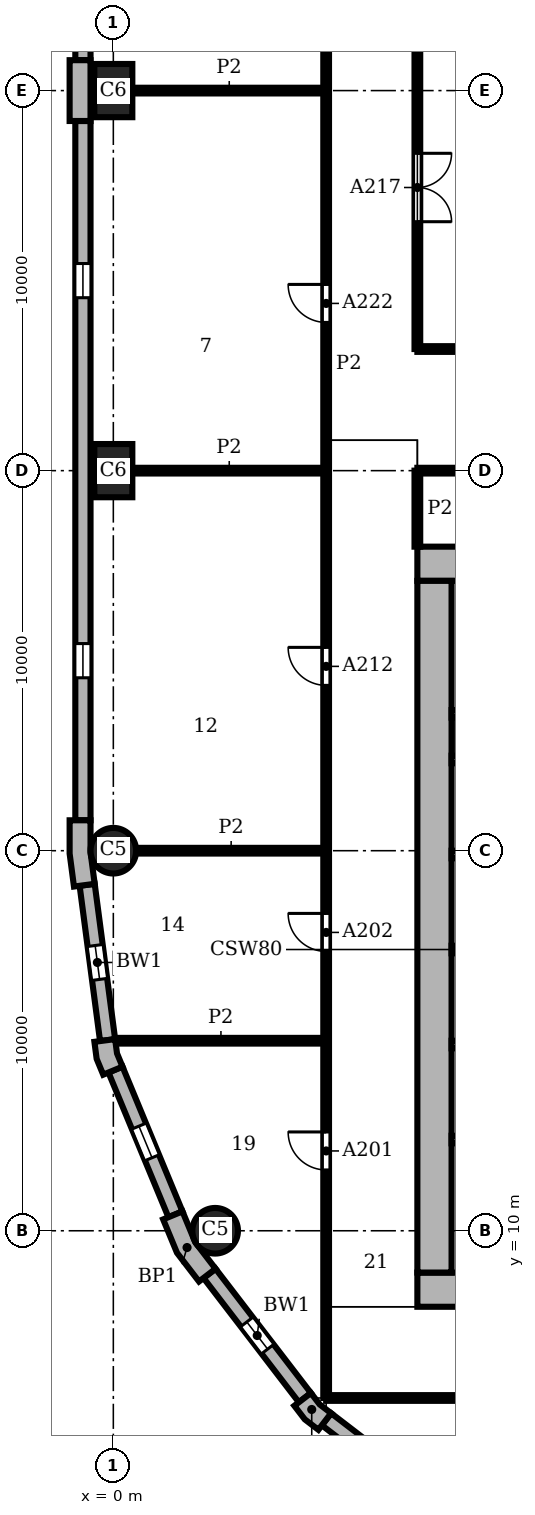
"""IFC4 building model, lengths in metres.
Left out: names, types, materials, properties, quantities, classifications, styles, units other than length and angle.
Written with IfcOpenShell. Run it as: python <this file> out.ifc"""

import sys

from ifc_helpers import new_model, si_unit, direction, frame, frame_2d, origin, origin_2d, place, context, subcontext, project, spatial, polyline, rectangle, circle, outline, extrude, element, fill, save


model = new_model("IFC4")
c1 = context("Model", 3, precision=1e-05, world=origin(), true_north=direction((0.0, 1.0)))
c2 = subcontext(c1, "Body", "Model", "MODEL_VIEW")
j1 = project(units=[si_unit("LENGTHUNIT", "METRE"), si_unit("PLANEANGLEUNIT", "RADIAN")], contexts=[c1])
p1 = place(None, origin())
s1 = spatial("IfcSite", under=j1, at=p1, CompositionType="ELEMENT")
p2 = place(p1, origin())
s2 = spatial("IfcBuilding", under=s1, at=p2, CompositionType="ELEMENT")
p3 = place(p2, frame((0.0, 0.0, 23.7)))
s3 = spatial("IfcBuildingStorey", under=s2, at=p3, CompositionType="ELEMENT", Elevation=23.7)
for number, where, z_axis, x_axis in (
    (1, (0.0, 40.0, 0.0), (0.0, 0.0, 1.0), (0.0, 1.0, 0.0)),
    (2, (0.0, 30.0, 0.0), (0.0, 0.0, 1.0), (0.0, 1.0, 0.0)),
):
    element("IfcColumn", number, at=place(p3, frame(where, z_axis=z_axis, x_axis=x_axis)), inside=s3, PredefinedType="COLUMN", context=c2, shape_type="SweptSolid", body=[
        extrude(rectangle(XDim=1.4, YDim=1.0, at=origin_2d()), origin(), (0.0, 0.0, 1.0), 3.9),
    ])
for number, where, z_axis, x_axis in (
    (3, (0.0, 20.0, 0.0), (0.0, 0.0, 1.0), (1.0, 0.0, 0.0)),
    (4, (2.679, 10.0, 0.0), (0.0, 0.0, 1.0), (1.0, 0.0, 0.0)),
):
    element("IfcColumn", number, at=place(p3, frame(where, z_axis=z_axis, x_axis=x_axis)), inside=s3, PredefinedType="COLUMN", context=c2, shape_type="SweptSolid", body=[
        extrude(circle(Radius=0.6, at=origin_2d()), origin(), (0.0, 0.0, 1.0), 3.9),
    ])
for number, where, z_axis, x_axis in (
    (5, (8.0, 8.45, 0.0), (0.0, 0.0, 1.0), (1.0, 0.0, 0.0)),
    (6, (28.0, 27.55, 0.0), (0.0, 0.0, 1.0), (-1.0, 0.0, 0.0)),
):
    element("IfcWall", number, at=place(p3, frame(where, z_axis=z_axis, x_axis=x_axis)), inside=s3, PredefinedType="SHEAR", context=c2, shape_type="SweptSolid", body=[
        extrude(rectangle(XDim=20.0, YDim=0.9, at=frame_2d((10.0, 0.0))), origin(), (0.0, 0.0, 1.0), 3.9),
    ])
p4 = place(p3, frame((8.45, 27.1, 0.0), z_axis=(0.0, 0.0, 1.0), x_axis=(0.0, -1.0, 0.0)))
e7 = element("IfcWall", 7, at=p4, inside=s3, PredefinedType="SHEAR", context=c2, shape_type="SweptSolid", body=[
    extrude(rectangle(XDim=18.2, YDim=0.9, at=frame_2d((9.1, 0.0))), origin(), (0.0, 0.0, 1.0), 3.9),
])
p5 = place(p3, origin())
e8 = element("IfcWall", 8, at=p5, inside=s3, PredefinedType="SOLIDWALL", context=c2, shape_type="SweptSolid", body=[
    extrude(outline(polyline([(-1.0, 40.8), (-1.15, 40.8), (-1.15, 40.0), (-1.15, 39.2), (-1.0, 39.2), (-0.6, 39.2), (-0.6, 40.0), (-0.6, 40.8), (-1.0, 40.8)])), origin(), (0.0, 0.0, 1.0), 3.9),
])
e9 = element("IfcWall", 9, at=p5, inside=s3, PredefinedType="SOLIDWALL", context=c2, shape_type="SweptSolid", body=[
    extrude(outline(polyline([(-1.0, 20.8), (-1.15, 20.8), (-1.15, 19.925), (-1.036, 19.057), (-0.887, 19.076), (-0.49, 19.128), (-0.6, 19.961), (-0.6, 20.8), (-1.0, 20.8)])), origin(), (0.0, 0.0, 1.0), 3.9),
])
e10 = element("IfcWall", 10, at=p5, inside=s3, PredefinedType="SOLIDWALL", context=c2, shape_type="SweptSolid", body=[
    extrude(outline(polyline([(-0.349, 14.99), (-0.498, 14.971), (-0.439, 14.523), (-0.266, 14.106), (-0.128, 14.164), (0.242, 14.317), (0.097, 14.667), (0.047, 15.043), (-0.349, 14.99)])), origin(), (0.0, 0.0, 1.0), 3.9),
])
e11 = element("IfcWall", 11, at=p5, inside=s3, PredefinedType="SOLIDWALL", context=c2, shape_type="SweptSolid", body=[
    extrude(outline(polyline([(1.449, 10.356), (1.311, 10.299), (1.675, 9.42), (2.254, 8.665), (2.373, 8.757), (2.69, 9.0), (2.155, 9.698), (1.819, 10.51), (1.449, 10.356)])), origin(), (0.0, 0.0, 1.0), 3.9),
])
e12 = element("IfcWall", 12, at=p5, inside=s3, PredefinedType="SOLIDWALL", context=c2, shape_type="SweptSolid", body=[
    extrude(outline(polyline([(4.882, 5.487), (4.763, 5.396), (5.038, 5.038), (5.396, 4.763), (5.487, 4.882), (5.731, 5.199), (5.43, 5.43), (5.199, 5.731), (4.882, 5.487)])), origin(), (0.0, 0.0, 1.0), 3.9),
])
p6 = place(p3, frame((-0.8, 59.2, 0.0), z_axis=(0.0, 0.0, 1.0), x_axis=(0.0, -1.0, 0.0)))
e13 = element("IfcWall", 13, at=p6, inside=s3, PredefinedType="SOLIDWALL", context=c2, shape_type="SweptSolid", body=[
    extrude(rectangle(XDim=18.4, YDim=0.4, at=frame_2d((9.2, 0.0))), origin(), (0.0, 0.0, 1.0), 3.9),
])
p7 = place(p6, frame((3.75, 0.0, 0.9)))
e14 = element("IfcOpeningElement", 14, at=p7, cuts=e13, PredefinedType="OPENING", context=c2, shape_type="SweptSolid", body=[
    extrude(rectangle(XDim=0.9, YDim=2.35, at=frame_2d((0.45, 1.175))), frame((0.0, 0.21, 0.0), z_axis=(0.0, -1.0, 0.0), x_axis=(1.0, 0.0, 0.0)), (0.0, 0.0, 1.0), 0.42),
])
p8 = place(p6, frame((13.75, 0.0, 0.9)))
e15 = element("IfcOpeningElement", 15, at=p8, cuts=e13, PredefinedType="OPENING", context=c2, shape_type="SweptSolid", body=[
    extrude(rectangle(XDim=0.9, YDim=2.35, at=frame_2d((0.45, 1.175))), frame((0.0, 0.21, 0.0), z_axis=(0.0, -1.0, 0.0), x_axis=(1.0, 0.0, 0.0)), (0.0, 0.0, 1.0), 0.42),
])
p9 = place(p3, frame((-0.8, 39.2, 0.0), z_axis=(0.0, 0.0, 1.0), x_axis=(0.0, -1.0, 0.0)))
e16 = element("IfcWall", 16, at=p9, inside=s3, PredefinedType="SOLIDWALL", context=c2, shape_type="SweptSolid", body=[
    extrude(rectangle(XDim=18.4, YDim=0.4, at=frame_2d((9.2, 0.0))), origin(), (0.0, 0.0, 1.0), 3.9),
])
p10 = place(p9, frame((3.75, 0.0, 0.9)))
e17 = element("IfcOpeningElement", 17, at=p10, cuts=e16, PredefinedType="OPENING", context=c2, shape_type="SweptSolid", body=[
    extrude(rectangle(XDim=0.9, YDim=2.35, at=frame_2d((0.45, 1.175))), frame((0.0, 0.21, 0.0), z_axis=(0.0, -1.0, 0.0), x_axis=(1.0, 0.0, 0.0)), (0.0, 0.0, 1.0), 0.42),
])
p11 = place(p9, frame((13.75, 0.0, 0.9)))
e18 = element("IfcOpeningElement", 18, at=p11, cuts=e16, PredefinedType="OPENING", context=c2, shape_type="SweptSolid", body=[
    extrude(rectangle(XDim=0.9, YDim=2.35, at=frame_2d((0.45, 1.175))), frame((0.0, 0.21, 0.0), z_axis=(0.0, -1.0, 0.0), x_axis=(1.0, 0.0, 0.0)), (0.0, 0.0, 1.0), 0.42),
])
p12 = place(p3, frame((-0.689, 19.102, 0.0), z_axis=(0.0, 0.0, 1.0), x_axis=(0.130514280502, -0.991446429508, 0.0)))
e19 = element("IfcWall", 19, at=p12, inside=s3, PredefinedType="SOLIDWALL", context=c2, shape_type="SweptSolid", body=[
    extrude(rectangle(XDim=4.121, YDim=0.4, at=frame_2d((2.061, 0.0))), origin(), (0.0, 0.0, 1.0), 3.9),
])
p13 = place(p12, frame((1.611, 0.0, 0.9)))
e20 = element("IfcOpeningElement", 20, at=p13, cuts=e19, PredefinedType="OPENING", context=c2, shape_type="SweptSolid", body=[
    extrude(rectangle(XDim=0.9, YDim=2.35, at=frame_2d((0.45, 1.175))), frame((0.0, 0.21, 0.0), z_axis=(0.0, -1.0, 0.0), x_axis=(1.0, 0.0, 0.0)), (0.0, 0.0, 1.0), 0.42),
])
p14 = place(p3, frame((0.057, 14.24, 0.0), z_axis=(0.0, 0.0, 1.0), x_axis=(0.382721546029, -0.923863744394, 0.0)))
e21 = element("IfcWall", 21, at=p14, inside=s3, PredefinedType="SOLIDWALL", context=c2, shape_type="SweptSolid", body=[
    extrude(rectangle(XDim=4.121, YDim=0.4, at=frame_2d((2.061, 0.0))), origin(), (0.0, 0.0, 1.0), 3.9),
])
p15 = place(p14, frame((1.611, 0.0, 0.9)))
e22 = element("IfcOpeningElement", 22, at=p15, cuts=e21, PredefinedType="OPENING", context=c2, shape_type="SweptSolid", body=[
    extrude(rectangle(XDim=0.9, YDim=2.35, at=frame_2d((0.45, 1.175))), frame((0.0, 0.21, 0.0), z_axis=(0.0, -1.0, 0.0), x_axis=(1.0, 0.0, 0.0)), (0.0, 0.0, 1.0), 0.42),
])
p16 = place(p3, frame((2.532, 8.878, 0.0), z_axis=(0.0, 0.0, 1.0), x_axis=(0.608759824817, -0.793354571229, 0.0)))
e23 = element("IfcWall", 23, at=p16, inside=s3, PredefinedType="SOLIDWALL", context=c2, shape_type="SweptSolid", body=[
    extrude(rectangle(XDim=4.121, YDim=0.4, at=frame_2d((2.061, 0.0))), origin(), (0.0, 0.0, 1.0), 3.9),
])
p17 = place(p16, frame((1.611, 0.0, 0.9)))
e24 = element("IfcOpeningElement", 24, at=p17, cuts=e23, PredefinedType="OPENING", context=c2, shape_type="SweptSolid", body=[
    extrude(rectangle(XDim=0.9, YDim=2.35, at=frame_2d((0.45, 1.175))), frame((0.0, 0.21, 0.0), z_axis=(0.0, -1.0, 0.0), x_axis=(1.0, 0.0, 0.0)), (0.0, 0.0, 1.0), 0.42),
])
p18 = place(p3, frame((5.609, 5.041, 0.0), z_axis=(0.0, 0.0, 1.0), x_axis=(0.793354571229, -0.608759824817, 0.0)))
e25 = element("IfcWall", 25, at=p18, inside=s3, PredefinedType="SOLIDWALL", context=c2, shape_type="SweptSolid", body=[
    extrude(rectangle(XDim=4.121, YDim=0.4, at=frame_2d((2.061, 0.0))), origin(), (0.0, 0.0, 1.0), 3.9),
])
p19 = place(p18, frame((1.611, 0.0, 0.9)))
e26 = element("IfcOpeningElement", 26, at=p19, cuts=e25, PredefinedType="OPENING", context=c2, shape_type="SweptSolid", body=[
    extrude(rectangle(XDim=0.9, YDim=2.35, at=frame_2d((0.45, 1.175))), frame((0.0, 0.21, 0.0), z_axis=(0.0, -1.0, 0.0), x_axis=(1.0, 0.0, 0.0)), (0.0, 0.0, 1.0), 0.42),
])
p20 = place(p3, frame((8.9, 12.4, 0.0), z_axis=(0.0, 0.0, 1.0), x_axis=(1.0, 0.0, 0.0)))
e27 = element("IfcWall", 27, at=p20, inside=s3, PredefinedType="SHEAR", context=c2, shape_type="SweptSolid", body=[
    extrude(rectangle(XDim=4.9, YDim=0.2, at=frame_2d((2.45, 0.0))), origin(), (0.0, 0.0, 1.0), 3.58),
])
for number, where, z_axis, x_axis in (
    (28, (8.9, 14.9, 0.0), (0.0, 0.0, 1.0), (1.0, 0.0, 0.0)),
    (29, (8.9, 17.4, 0.0), (0.0, 0.0, 1.0), (1.0, 0.0, 0.0)),
    (30, (8.9, 19.9, 0.0), (0.0, 0.0, 1.0), (1.0, 0.0, 0.0)),
    (31, (8.9, 22.4, 0.0), (0.0, 0.0, 1.0), (1.0, 0.0, 0.0)),
):
    element("IfcWall", number, at=place(p3, frame(where, z_axis=z_axis, x_axis=x_axis)), inside=s3, PredefinedType="SHEAR", context=c2, shape_type="SweptSolid", body=[
        extrude(rectangle(XDim=2.8, YDim=0.2, at=frame_2d((1.4, 0.0))), origin(), (0.0, 0.0, 1.0), 3.58),
    ])
p21 = place(p3, frame((8.9, 23.6, 0.0), z_axis=(0.0, 0.0, 1.0), x_axis=(1.0, 0.0, 0.0)))
e32 = element("IfcWall", 32, at=p21, inside=s3, PredefinedType="SHEAR", context=c2, shape_type="SweptSolid", body=[
    extrude(rectangle(XDim=4.9, YDim=0.2, at=frame_2d((2.45, 0.0))), origin(), (0.0, 0.0, 1.0), 3.58),
])
p22 = place(p3, frame((5.6, 5.6, 0.0), z_axis=(0.0, 0.0, 1.0), x_axis=(0.0, 1.0, 0.0)))
e33 = element("IfcWall", 33, at=p22, inside=s3, PredefinedType="PARTITIONING", context=c2, shape_type="SweptSolid", body=[
    extrude(rectangle(XDim=54.4, YDim=0.15, at=frame_2d((27.2, 0.0))), origin(), (0.0, 0.0, 1.0), 3.58),
])
p23 = place(p22, frame((6.0, 0.0, 0.0)))
e34 = element("IfcOpeningElement", 34, at=p23, cuts=e33, PredefinedType="OPENING", context=c2, shape_type="SweptSolid", body=[
    extrude(rectangle(XDim=1.0, YDim=2.1, at=frame_2d((0.5, 1.05))), frame((0.0, 0.085, 0.0), z_axis=(0.0, -1.0, 0.0), x_axis=(1.0, 0.0, 0.0)), (0.0, 0.0, 1.0), 0.17),
])
p24 = place(p22, frame((11.75, 0.0, 0.0)))
e35 = element("IfcOpeningElement", 35, at=p24, cuts=e33, PredefinedType="OPENING", context=c2, shape_type="SweptSolid", body=[
    extrude(rectangle(XDim=1.0, YDim=2.1, at=frame_2d((0.5, 1.05))), frame((0.0, 0.085, 0.0), z_axis=(0.0, -1.0, 0.0), x_axis=(1.0, 0.0, 0.0)), (0.0, 0.0, 1.0), 0.17),
])
p25 = place(p22, frame((18.75, 0.0, 0.0)))
e36 = element("IfcOpeningElement", 36, at=p25, cuts=e33, PredefinedType="OPENING", context=c2, shape_type="SweptSolid", body=[
    extrude(rectangle(XDim=1.0, YDim=2.1, at=frame_2d((0.5, 1.05))), frame((0.0, 0.085, 0.0), z_axis=(0.0, -1.0, 0.0), x_axis=(1.0, 0.0, 0.0)), (0.0, 0.0, 1.0), 0.17),
])
p26 = place(p22, frame((28.3, 0.0, 0.0)))
e37 = element("IfcOpeningElement", 37, at=p26, cuts=e33, PredefinedType="OPENING", context=c2, shape_type="SweptSolid", body=[
    extrude(rectangle(XDim=1.0, YDim=2.1, at=frame_2d((0.5, 1.05))), frame((0.0, 0.085, 0.0), z_axis=(0.0, -1.0, 0.0), x_axis=(1.0, 0.0, 0.0)), (0.0, 0.0, 1.0), 0.17),
])
p27 = place(p22, frame((37.75, 0.0, 0.0)))
e38 = element("IfcOpeningElement", 38, at=p27, cuts=e33, PredefinedType="OPENING", context=c2, shape_type="SweptSolid", body=[
    extrude(rectangle(XDim=1.0, YDim=2.1, at=frame_2d((0.5, 1.05))), frame((0.0, 0.085, 0.0), z_axis=(0.0, -1.0, 0.0), x_axis=(1.0, 0.0, 0.0)), (0.0, 0.0, 1.0), 0.17),
])
p28 = place(p22, frame((49.5, 0.0, 0.0)))
e39 = element("IfcOpeningElement", 39, at=p28, cuts=e33, PredefinedType="OPENING", context=c2, shape_type="SweptSolid", body=[
    extrude(rectangle(XDim=1.0, YDim=2.1, at=frame_2d((0.5, 1.05))), frame((0.0, 0.085, 0.0), z_axis=(0.0, -1.0, 0.0), x_axis=(1.0, 0.0, 0.0)), (0.0, 0.0, 1.0), 0.17),
])
p29 = place(p3, frame((8.0, 28.0, 0.0), z_axis=(0.0, 0.0, 1.0), x_axis=(0.0, 1.0, 0.0)))
e40 = element("IfcWall", 40, at=p29, inside=s3, PredefinedType="PARTITIONING", context=c2, shape_type="SweptSolid", body=[
    extrude(rectangle(XDim=2.0, YDim=0.15, at=frame_2d((1.0, 0.0))), origin(), (0.0, 0.0, 1.0), 3.58),
])
p30 = place(p3, frame((8.0, 33.2, 0.0), z_axis=(0.0, 0.0, 1.0), x_axis=(0.0, 1.0, 0.0)))
e41 = element("IfcWall", 41, at=p30, inside=s3, PredefinedType="PARTITIONING", context=c2, shape_type="SweptSolid", body=[
    extrude(rectangle(XDim=24.1, YDim=0.15, at=frame_2d((12.05, 0.0))), origin(), (0.0, 0.0, 1.0), 3.58),
])
p31 = place(p30, frame((3.35, 0.0, 0.0)))
e42 = element("IfcOpeningElement", 42, at=p31, cuts=e41, PredefinedType="OPENING", context=c2, shape_type="SweptSolid", body=[
    extrude(rectangle(XDim=1.8, YDim=2.1, at=frame_2d((0.9, 1.05))), frame((0.0, 0.085, 0.0), z_axis=(0.0, -1.0, 0.0), x_axis=(1.0, 0.0, 0.0)), (0.0, 0.0, 1.0), 0.17),
])
p32 = place(p30, frame((18.15, 0.0, 0.0)))
e43 = element("IfcOpeningElement", 43, at=p32, cuts=e41, PredefinedType="OPENING", context=c2, shape_type="SweptSolid", body=[
    extrude(rectangle(XDim=1.0, YDim=2.1, at=frame_2d((0.5, 1.05))), frame((0.0, 0.085, 0.0), z_axis=(0.0, -1.0, 0.0), x_axis=(1.0, 0.0, 0.0)), (0.0, 0.0, 1.0), 0.17),
])
p33 = place(p3, frame((5.6, 5.6, 0.0), z_axis=(0.0, 0.0, 1.0), x_axis=(1.0, 0.0, 0.0)))
e44 = element("IfcWall", 44, at=p33, inside=s3, PredefinedType="PARTITIONING", context=c2, shape_type="SweptSolid", body=[
    extrude(rectangle(XDim=25.4, YDim=0.15, at=frame_2d((12.7, 0.0))), origin(), (0.0, 0.0, 1.0), 3.58),
])
p34 = place(p33, frame((4.1, 0.0, 0.0)))
e45 = element("IfcOpeningElement", 45, at=p34, cuts=e44, PredefinedType="OPENING", context=c2, shape_type="SweptSolid", body=[
    extrude(rectangle(XDim=1.0, YDim=2.1, at=frame_2d((0.5, 1.05))), frame((0.0, 0.085, 0.0), z_axis=(0.0, -1.0, 0.0), x_axis=(1.0, 0.0, 0.0)), (0.0, 0.0, 1.0), 0.17),
])
p35 = place(p33, frame((11.25, 0.0, 0.0)))
e46 = element("IfcOpeningElement", 46, at=p35, cuts=e44, PredefinedType="OPENING", context=c2, shape_type="SweptSolid", body=[
    extrude(rectangle(XDim=0.8, YDim=2.1, at=frame_2d((0.4, 1.05))), frame((0.0, 0.085, 0.0), z_axis=(0.0, -1.0, 0.0), x_axis=(1.0, 0.0, 0.0)), (0.0, 0.0, 1.0), 0.17),
])
p36 = place(p33, frame((19.25, 0.0, 0.0)))
e47 = element("IfcOpeningElement", 47, at=p36, cuts=e44, PredefinedType="OPENING", context=c2, shape_type="SweptSolid", body=[
    extrude(rectangle(XDim=1.0, YDim=2.1, at=frame_2d((0.5, 1.05))), frame((0.0, 0.085, 0.0), z_axis=(0.0, -1.0, 0.0), x_axis=(1.0, 0.0, 0.0)), (0.0, 0.0, 1.0), 0.17),
])
p37 = place(p3, frame((0.063, 15.0, 0.0), z_axis=(0.0, 0.0, 1.0), x_axis=(1.0, 0.0, 0.0)))
e48 = element("IfcWall", 48, at=p37, inside=s3, PredefinedType="PARTITIONING", context=c2, shape_type="SweptSolid", body=[
    extrude(rectangle(XDim=5.537, YDim=0.15, at=frame_2d((2.769, 0.0))), origin(), (0.0, 0.0, 1.0), 3.58),
])
p38 = place(p3, frame((0.6, 20.0, 0.0), z_axis=(0.0, 0.0, 1.0), x_axis=(1.0, 0.0, 0.0)))
e49 = element("IfcWall", 49, at=p38, inside=s3, PredefinedType="PARTITIONING", context=c2, shape_type="SweptSolid", body=[
    extrude(rectangle(XDim=5.0, YDim=0.15, at=frame_2d((2.5, 0.0))), origin(), (0.0, 0.0, 1.0), 3.58),
])
p39 = place(p3, frame((0.5, 30.0, 0.0), z_axis=(0.0, 0.0, 1.0), x_axis=(1.0, 0.0, 0.0)))
e50 = element("IfcWall", 50, at=p39, inside=s3, PredefinedType="PARTITIONING", context=c2, shape_type="SweptSolid", body=[
    extrude(rectangle(XDim=5.1, YDim=0.15, at=frame_2d((2.55, 0.0))), origin(), (0.0, 0.0, 1.0), 3.58),
])
p40 = place(p3, frame((8.0, 30.0, 0.0), z_axis=(0.0, 0.0, 1.0), x_axis=(1.0, 0.0, 0.0)))
e51 = element("IfcWall", 51, at=p40, inside=s3, PredefinedType="PARTITIONING", context=c2, shape_type="SweptSolid", body=[
    extrude(rectangle(XDim=1.2, YDim=0.15, at=frame_2d((0.6, 0.0))), origin(), (0.0, 0.0, 1.0), 3.58),
])
p41 = place(p3, frame((8.0, 33.2, 0.0), z_axis=(0.0, 0.0, 1.0), x_axis=(1.0, 0.0, 0.0)))
e52 = element("IfcWall", 52, at=p41, inside=s3, PredefinedType="PARTITIONING", context=c2, shape_type="SweptSolid", body=[
    extrude(rectangle(XDim=5.8, YDim=0.15, at=frame_2d((2.9, 0.0))), origin(), (0.0, 0.0, 1.0), 3.58),
])
p42 = place(p3, frame((0.5, 40.0, 0.0), z_axis=(0.0, 0.0, 1.0), x_axis=(1.0, 0.0, 0.0)))
e53 = element("IfcWall", 53, at=p42, inside=s3, PredefinedType="PARTITIONING", context=c2, shape_type="SweptSolid", body=[
    extrude(rectangle(XDim=5.1, YDim=0.15, at=frame_2d((2.55, 0.0))), origin(), (0.0, 0.0, 1.0), 3.58),
])
p43 = place(p10, origin())
e54 = element("IfcWindow", 54, at=p43, inside=s3, PartitioningType="SINGLE_PANEL", PredefinedType="WINDOW", context=c2, shape_type="SweptSolid", body=[
    extrude(rectangle(XDim=0.9, YDim=2.35, at=frame_2d((0.45, 1.175))), frame((0.0, 0.16, 0.0), z_axis=(0.0, -1.0, 0.0), x_axis=(1.0, 0.0, 0.0)), (0.0, 0.0, 1.0), 0.06),
])
fill(e17, e54)
p44 = place(p11, origin())
e55 = element("IfcWindow", 55, at=p44, inside=s3, PartitioningType="SINGLE_PANEL", PredefinedType="WINDOW", context=c2, shape_type="SweptSolid", body=[
    extrude(rectangle(XDim=0.9, YDim=2.35, at=frame_2d((0.45, 1.175))), frame((0.0, 0.16, 0.0), z_axis=(0.0, -1.0, 0.0), x_axis=(1.0, 0.0, 0.0)), (0.0, 0.0, 1.0), 0.06),
])
fill(e18, e55)
p45 = place(p13, origin())
e56 = element("IfcWindow", 56, at=p45, inside=s3, PartitioningType="SINGLE_PANEL", PredefinedType="WINDOW", context=c2, shape_type="SweptSolid", body=[
    extrude(rectangle(XDim=0.9, YDim=2.35, at=frame_2d((0.45, 1.175))), frame((0.0, 0.16, 0.0), z_axis=(0.0, -1.0, 0.0), x_axis=(1.0, 0.0, 0.0)), (0.0, 0.0, 1.0), 0.06),
])
fill(e20, e56)
p46 = place(p15, origin())
e57 = element("IfcWindow", 57, at=p46, inside=s3, PartitioningType="SINGLE_PANEL", PredefinedType="WINDOW", context=c2, shape_type="SweptSolid", body=[
    extrude(rectangle(XDim=0.9, YDim=2.35, at=frame_2d((0.45, 1.175))), frame((0.0, 0.16, 0.0), z_axis=(0.0, -1.0, 0.0), x_axis=(1.0, 0.0, 0.0)), (0.0, 0.0, 1.0), 0.06),
])
fill(e22, e57)
p47 = place(p17, origin())
e58 = element("IfcWindow", 58, at=p47, inside=s3, PartitioningType="SINGLE_PANEL", PredefinedType="WINDOW", context=c2, shape_type="SweptSolid", body=[
    extrude(rectangle(XDim=0.9, YDim=2.35, at=frame_2d((0.45, 1.175))), frame((0.0, 0.16, 0.0), z_axis=(0.0, -1.0, 0.0), x_axis=(1.0, 0.0, 0.0)), (0.0, 0.0, 1.0), 0.06),
])
fill(e24, e58)
p48 = place(p23, origin())
e59 = element("IfcDoor", 59, at=p48, inside=s3, OperationType="SINGLE_SWING_RIGHT", PredefinedType="DOOR", context=c2, shape_type="SweptSolid", body=[
    extrude(rectangle(XDim=1.0, YDim=2.1, at=frame_2d((0.5, 1.05))), frame((0.0, 0.025, 0.0), z_axis=(0.0, -1.0, 0.0), x_axis=(1.0, 0.0, 0.0)), (0.0, 0.0, 1.0), 0.05),
])
fill(e34, e59)
p49 = place(p24, origin())
e60 = element("IfcDoor", 60, at=p49, inside=s3, OperationType="SINGLE_SWING_RIGHT", PredefinedType="DOOR", context=c2, shape_type="SweptSolid", body=[
    extrude(rectangle(XDim=1.0, YDim=2.1, at=frame_2d((0.5, 1.05))), frame((0.0, 0.025, 0.0), z_axis=(0.0, -1.0, 0.0), x_axis=(1.0, 0.0, 0.0)), (0.0, 0.0, 1.0), 0.05),
])
fill(e35, e60)
p50 = place(p25, origin())
e61 = element("IfcDoor", 61, at=p50, inside=s3, OperationType="SINGLE_SWING_RIGHT", PredefinedType="DOOR", context=c2, shape_type="SweptSolid", body=[
    extrude(rectangle(XDim=1.0, YDim=2.1, at=frame_2d((0.5, 1.05))), frame((0.0, 0.025, 0.0), z_axis=(0.0, -1.0, 0.0), x_axis=(1.0, 0.0, 0.0)), (0.0, 0.0, 1.0), 0.05),
])
fill(e36, e61)
p51 = place(p31, frame((1.8, 0.0, 0.0), z_axis=(0.0, 0.0, 1.0), x_axis=(-1.0, 0.0, 0.0)))
e62 = element("IfcDoor", 62, at=p51, inside=s3, OperationType="DOUBLE_DOOR_SINGLE_SWING", PredefinedType="DOOR", context=c2, shape_type="SweptSolid", body=[
    extrude(rectangle(XDim=1.8, YDim=2.1, at=frame_2d((0.9, 1.05))), frame((0.0, 0.025, 0.0), z_axis=(0.0, -1.0, 0.0), x_axis=(1.0, 0.0, 0.0)), (0.0, 0.0, 1.0), 0.05),
])
fill(e42, e62)
p52 = place(p26, origin())
e63 = element("IfcDoor", 63, at=p52, inside=s3, OperationType="SINGLE_SWING_RIGHT", PredefinedType="DOOR", context=c2, shape_type="SweptSolid", body=[
    extrude(rectangle(XDim=1.0, YDim=2.1, at=frame_2d((0.5, 1.05))), frame((0.0, 0.025, 0.0), z_axis=(0.0, -1.0, 0.0), x_axis=(1.0, 0.0, 0.0)), (0.0, 0.0, 1.0), 0.05),
])
fill(e37, e63)
save(model, sys.argv[1])
